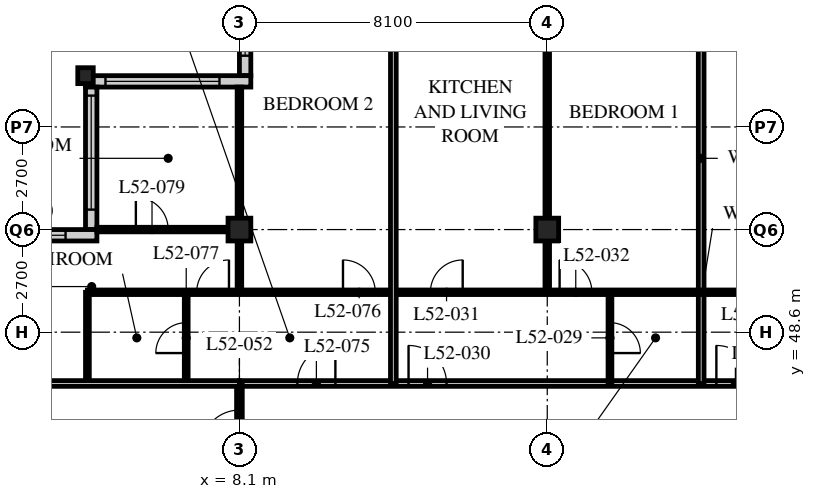
"""IFC4 building model, lengths in metres.
Left out: names, types, materials, properties, quantities, classifications, styles, units other than length and angle.
Written with IfcOpenShell. Run it as: python <this file> out.ifc"""

import sys

from ifc_helpers import new_model, si_unit, direction, frame, frame_2d, origin, origin_2d, place, context, subcontext, project, spatial, rectangle, hollow_rectangle, i_section, extrude, element, fill, save


model = new_model("IFC4")
c1 = context("Model", 3, precision=1e-05, world=origin(), true_north=direction((0.0, 1.0)))
c2 = subcontext(c1, "Body", "Model", "MODEL_VIEW")
j1 = project(units=[si_unit("LENGTHUNIT", "METRE"), si_unit("PLANEANGLEUNIT", "RADIAN")], contexts=[c1])
p1 = place(None, origin())
s1 = spatial("IfcSite", under=j1, at=p1, CompositionType="ELEMENT")
p2 = place(p1, origin())
s2 = spatial("IfcBuilding", under=s1, at=p2, CompositionType="ELEMENT")
p3 = place(p2, frame((0.0, 0.0, 202.8)))
s3 = spatial("IfcBuildingStorey", under=s2, at=p3, CompositionType="ELEMENT", Elevation=202.8)
p4 = place(p3, frame((4.05, 55.35, 0.0), z_axis=(0.0, 0.0, 1.0), x_axis=(1.0, 0.0, 0.0)))
e1 = element("IfcColumn", 1, at=p4, inside=s3, PredefinedType="COLUMN", context=c2, shape_type="SweptSolid", body=[
    extrude(i_section(OverallWidth=0.407, OverallDepth=0.419, WebThickness=0.031, FlangeThickness=0.049, FilletRadius=0.015, at=origin_2d()), origin(), (0.0, 0.0, 1.0), 3.6),
])
for number, where, z_axis, x_axis in (
    (2, (8.1, 51.3, 0.0), (0.0, 0.0, 1.0), (1.0, 0.0, 0.0)),
    (3, (16.2, 51.3, 0.0), (0.0, 0.0, 1.0), (1.0, 0.0, 0.0)),
):
    element("IfcColumn", number, at=place(p3, frame(where, z_axis=z_axis, x_axis=x_axis)), inside=s3, PredefinedType="COLUMN", context=c2, shape_type="SweptSolid", body=[
        extrude(hollow_rectangle(XDim=0.6, YDim=0.6, WallThickness=0.05, at=origin_2d()), origin(), (0.0, 0.0, 1.0), 3.6),
    ])
p5 = place(p3, frame((8.25, 59.1, 0.0), z_axis=(0.0, 0.0, 1.0), x_axis=(0.0, -1.0, 0.0)))
e4 = element("IfcWall", 4, at=p5, inside=s3, PredefinedType="SOLIDWALL", context=c2, shape_type="SweptSolid", body=[
    extrude(rectangle(XDim=3.75, YDim=0.3, at=frame_2d((1.875, 0.0))), origin(), (0.0, 0.0, 1.0), 3.39),
])
p6 = place(p5, frame((0.225, 0.0, 0.6)))
e5 = element("IfcOpeningElement", 5, at=p6, cuts=e4, PredefinedType="OPENING", context=c2, shape_type="SweptSolid", body=[
    extrude(rectangle(XDim=3.0, YDim=2.0, at=frame_2d((1.5, 1.0))), frame((0.0, 0.16, 0.0), z_axis=(0.0, -1.0, 0.0), x_axis=(1.0, 0.0, 0.0)), (0.0, 0.0, 1.0), 0.32),
])
p7 = place(p3, frame((8.4, 55.2, 0.0), z_axis=(0.0, 0.0, 1.0), x_axis=(-1.0, 0.0, 0.0)))
e6 = element("IfcWall", 6, at=p7, inside=s3, PredefinedType="SOLIDWALL", context=c2, shape_type="SweptSolid", body=[
    extrude(rectangle(XDim=4.35, YDim=0.3, at=frame_2d((2.175, 0.0))), origin(), (0.0, 0.0, 1.0), 3.39),
])
p8 = place(p7, frame((0.825, 0.0, 0.6)))
e7 = element("IfcOpeningElement", 7, at=p8, cuts=e6, PredefinedType="OPENING", context=c2, shape_type="SweptSolid", body=[
    extrude(rectangle(XDim=3.0, YDim=2.0, at=frame_2d((1.5, 1.0))), frame((0.0, 0.16, 0.0), z_axis=(0.0, -1.0, 0.0), x_axis=(1.0, 0.0, 0.0)), (0.0, 0.0, 1.0), 0.32),
])
p9 = place(p3, frame((4.2, 55.05, 0.0), z_axis=(0.0, 0.0, 1.0), x_axis=(0.0, -1.0, 0.0)))
e8 = element("IfcWall", 8, at=p9, inside=s3, PredefinedType="SOLIDWALL", context=c2, shape_type="SweptSolid", body=[
    extrude(rectangle(XDim=3.75, YDim=0.3, at=frame_2d((1.875, 0.0))), origin(), (0.0, 0.0, 1.0), 3.39),
])
p10 = place(p9, frame((0.225, 0.0, 0.6)))
e9 = element("IfcOpeningElement", 9, at=p10, cuts=e8, PredefinedType="OPENING", context=c2, shape_type="SweptSolid", body=[
    extrude(rectangle(XDim=3.0, YDim=2.0, at=frame_2d((1.5, 1.0))), frame((0.0, 0.16, 0.0), z_axis=(0.0, -1.0, 0.0), x_axis=(1.0, 0.0, 0.0)), (0.0, 0.0, 1.0), 0.32),
])
p11 = place(p3, frame((4.35, 51.15, 0.0), z_axis=(0.0, 0.0, 1.0), x_axis=(-1.0, 0.0, 0.0)))
e10 = element("IfcWall", 10, at=p11, inside=s3, PredefinedType="SOLIDWALL", context=c2, shape_type="SweptSolid", body=[
    extrude(rectangle(XDim=4.35, YDim=0.3, at=frame_2d((2.175, 0.0))), origin(), (0.0, 0.0, 1.0), 3.39),
])
p12 = place(p11, frame((0.825, 0.0, 0.6)))
e11 = element("IfcOpeningElement", 11, at=p12, cuts=e10, PredefinedType="OPENING", context=c2, shape_type="SweptSolid", body=[
    extrude(rectangle(XDim=3.0, YDim=2.0, at=frame_2d((1.5, 1.0))), frame((0.0, 0.16, 0.0), z_axis=(0.0, -1.0, 0.0), x_axis=(1.0, 0.0, 0.0)), (0.0, 0.0, 1.0), 0.32),
])
p13 = place(p3, frame((8.1, 47.25, 0.0), z_axis=(0.0, 0.0, 1.0), x_axis=(1.0, 0.0, 0.0)))
e12 = element("IfcWall", 12, at=p13, inside=s3, PredefinedType="PARTITIONING", context=c2, shape_type="SweptSolid", body=[
    extrude(rectangle(XDim=36.45, YDim=0.15, at=frame_2d((18.225, 0.0))), origin(), (0.0, 0.0, 1.0), 3.39),
])
p14 = place(p13, frame((4.45, 0.0, 0.0)))
e13 = element("IfcOpeningElement", 13, at=p14, cuts=e12, PredefinedType="OPENING", context=c2, shape_type="SweptSolid", body=[
    extrude(rectangle(XDim=1.0, YDim=2.1, at=frame_2d((0.5, 1.05))), frame((0.0, 0.085, 0.0), z_axis=(0.0, -1.0, 0.0), x_axis=(1.0, 0.0, 0.0)), (0.0, 0.0, 1.0), 0.17),
])
p15 = place(p13, frame((12.55, 0.0, 0.0)))
e14 = element("IfcOpeningElement", 14, at=p15, cuts=e12, PredefinedType="OPENING", context=c2, shape_type="SweptSolid", body=[
    extrude(rectangle(XDim=1.0, YDim=2.1, at=frame_2d((0.5, 1.05))), frame((0.0, 0.085, 0.0), z_axis=(0.0, -1.0, 0.0), x_axis=(1.0, 0.0, 0.0)), (0.0, 0.0, 1.0), 0.17),
])
p16 = place(p13, frame((30.7, 0.0, 0.0)))
e15 = element("IfcOpeningElement", 15, at=p16, cuts=e12, PredefinedType="OPENING", context=c2, shape_type="SweptSolid", body=[
    extrude(rectangle(XDim=1.0, YDim=2.1, at=frame_2d((0.5, 1.05))), frame((0.0, 0.085, 0.0), z_axis=(0.0, -1.0, 0.0), x_axis=(1.0, 0.0, 0.0)), (0.0, 0.0, 1.0), 0.17),
])
p17 = place(p13, frame((33.925, 0.0, 0.0)))
e16 = element("IfcOpeningElement", 16, at=p17, cuts=e12, PredefinedType="OPENING", context=c2, shape_type="SweptSolid", body=[
    extrude(rectangle(XDim=1.0, YDim=2.1, at=frame_2d((0.5, 1.05))), frame((0.0, 0.085, 0.0), z_axis=(0.0, -1.0, 0.0), x_axis=(1.0, 0.0, 0.0)), (0.0, 0.0, 1.0), 0.17),
])
p18 = place(p13, frame((1.525, 0.0, 0.0)))
e17 = element("IfcOpeningElement", 17, at=p18, cuts=e12, PredefinedType="OPENING", context=c2, shape_type="SweptSolid", body=[
    extrude(rectangle(XDim=1.0, YDim=2.1, at=frame_2d((0.5, 1.05))), frame((0.0, 0.085, 0.0), z_axis=(0.0, -1.0, 0.0), x_axis=(1.0, 0.0, 0.0)), (0.0, 0.0, 1.0), 0.17),
])
p19 = place(p3, frame((8.1, 18.9, 0.0), z_axis=(0.0, 0.0, 1.0), x_axis=(0.0, 1.0, 0.0)))
e18 = element("IfcWall", 18, at=p19, inside=s3, PredefinedType="PARTITIONING", context=c2, shape_type="SweptSolid", body=[
    extrude(rectangle(XDim=28.35, YDim=0.15, at=frame_2d((14.175, 0.0))), origin(), (0.0, 0.0, 1.0), 2.778),
])
p20 = place(p19, frame((0.9, 0.0, 0.0)))
e19 = element("IfcOpeningElement", 19, at=p20, cuts=e18, PredefinedType="OPENING", context=c2, shape_type="SweptSolid", body=[
    extrude(rectangle(XDim=1.0, YDim=2.1, at=frame_2d((0.5, 1.05))), frame((0.0, 0.085, 0.0), z_axis=(0.0, -1.0, 0.0), x_axis=(1.0, 0.0, 0.0)), (0.0, 0.0, 1.0), 0.17),
])
p21 = place(p19, frame((17.1, 0.0, 0.0)))
e20 = element("IfcOpeningElement", 20, at=p21, cuts=e18, PredefinedType="OPENING", context=c2, shape_type="SweptSolid", body=[
    extrude(rectangle(XDim=1.0, YDim=2.1, at=frame_2d((0.5, 1.05))), frame((0.0, 0.085, 0.0), z_axis=(0.0, -1.0, 0.0), x_axis=(1.0, 0.0, 0.0)), (0.0, 0.0, 1.0), 0.17),
])
p22 = place(p19, frame((26.65, 0.0, 0.0)))
e21 = element("IfcOpeningElement", 21, at=p22, cuts=e18, PredefinedType="OPENING", context=c2, shape_type="SweptSolid", body=[
    extrude(rectangle(XDim=1.0, YDim=2.1, at=frame_2d((0.5, 1.05))), frame((0.0, 0.085, 0.0), z_axis=(0.0, -1.0, 0.0), x_axis=(1.0, 0.0, 0.0)), (0.0, 0.0, 1.0), 0.17),
])
p23 = place(p3, frame((17.85, 47.25, 0.0), z_axis=(0.0, 0.0, 1.0), x_axis=(0.0, 1.0, 0.0)))
e22 = element("IfcWall", 22, at=p23, inside=s3, PredefinedType="PARTITIONING", context=c2, shape_type="SweptSolid", body=[
    extrude(rectangle(XDim=2.4, YDim=0.1, at=frame_2d((1.2, 0.0))), origin(), (0.0, 0.0, 1.0), 3.39),
])
p24 = place(p23, frame((0.8, 0.0, 0.0)))
e23 = element("IfcOpeningElement", 23, at=p24, cuts=e22, PredefinedType="OPENING", context=c2, shape_type="SweptSolid", body=[
    extrude(rectangle(XDim=0.8, YDim=2.1, at=frame_2d((0.4, 1.05))), frame((0.0, 0.06, 0.0), z_axis=(0.0, -1.0, 0.0), x_axis=(1.0, 0.0, 0.0)), (0.0, 0.0, 1.0), 0.12),
])
p25 = place(p3, frame((16.2, 49.65, 0.0), z_axis=(0.0, 0.0, 1.0), x_axis=(0.0, 1.0, 0.0)))
e24 = element("IfcWall", 24, at=p25, inside=s3, PredefinedType="PARTITIONING", context=c2, shape_type="SweptSolid", body=[
    extrude(rectangle(XDim=9.45, YDim=0.12, at=frame_2d((4.725, 0.0))), origin(), (0.0, 0.0, 1.0), 2.778),
])
p26 = place(p3, frame((20.25, 47.25, 0.0), z_axis=(0.0, 0.0, 1.0), x_axis=(0.0, 1.0, 0.0)))
e25 = element("IfcWall", 25, at=p26, inside=s3, PredefinedType="PARTITIONING", context=c2, shape_type="SweptSolid", body=[
    extrude(rectangle(XDim=11.85, YDim=0.15, at=frame_2d((5.925, 0.0))), origin(), (0.0, 0.0, 1.0), 3.39),
])
p27 = place(p3, frame((6.7, 47.25, 0.0), z_axis=(0.0, 0.0, 1.0), x_axis=(0.0, 1.0, 0.0)))
e26 = element("IfcWall", 26, at=p27, inside=s3, PredefinedType="PARTITIONING", context=c2, shape_type="SweptSolid", body=[
    extrude(rectangle(XDim=2.4, YDim=0.1, at=frame_2d((1.2, 0.0))), origin(), (0.0, 0.0, 1.0), 3.39),
])
p28 = place(p27, frame((0.8, 0.0, 0.0)))
e27 = element("IfcOpeningElement", 27, at=p28, cuts=e26, PredefinedType="OPENING", context=c2, shape_type="SweptSolid", body=[
    extrude(rectangle(XDim=0.8, YDim=2.1, at=frame_2d((0.4, 1.05))), frame((0.0, 0.06, 0.0), z_axis=(0.0, -1.0, 0.0), x_axis=(1.0, 0.0, 0.0)), (0.0, 0.0, 1.0), 0.12),
])
p29 = place(p3, frame((4.1, 47.25, 0.0), z_axis=(0.0, 0.0, 1.0), x_axis=(0.0, 1.0, 0.0)))
e28 = element("IfcWall", 28, at=p29, inside=s3, PredefinedType="PARTITIONING", context=c2, shape_type="SweptSolid", body=[
    extrude(rectangle(XDim=2.4, YDim=0.1, at=frame_2d((1.2, 0.0))), origin(), (0.0, 0.0, 1.0), 3.39),
])
p30 = place(p3, frame((4.1, 49.65, 0.0), z_axis=(0.0, 0.0, 1.0), x_axis=(1.0, 0.0, 0.0)))
e29 = element("IfcWall", 29, at=p30, inside=s3, PredefinedType="PARTITIONING", context=c2, shape_type="SweptSolid", body=[
    extrude(rectangle(XDim=32.35, YDim=0.12, at=frame_2d((16.175, 0.0))), origin(), (0.0, 0.0, 1.0), 3.39),
])
p31 = place(p30, frame((9.025, 0.0, 0.0)))
e30 = element("IfcOpeningElement", 30, at=p31, cuts=e29, PredefinedType="OPENING", context=c2, shape_type="SweptSolid", body=[
    extrude(rectangle(XDim=0.85, YDim=2.1, at=frame_2d((0.425, 1.05))), frame((0.0, 0.07, 0.0), z_axis=(0.0, -1.0, 0.0), x_axis=(1.0, 0.0, 0.0)), (0.0, 0.0, 1.0), 0.14),
])
p32 = place(p30, frame((12.425, 0.0, 0.0)))
e31 = element("IfcOpeningElement", 31, at=p32, cuts=e29, PredefinedType="OPENING", context=c2, shape_type="SweptSolid", body=[
    extrude(rectangle(XDim=0.85, YDim=2.1, at=frame_2d((0.425, 1.05))), frame((0.0, 0.07, 0.0), z_axis=(0.0, -1.0, 0.0), x_axis=(1.0, 0.0, 0.0)), (0.0, 0.0, 1.0), 0.14),
])
p33 = place(p30, frame((17.125, 0.0, 0.0)))
e32 = element("IfcOpeningElement", 32, at=p33, cuts=e29, PredefinedType="OPENING", context=c2, shape_type="SweptSolid", body=[
    extrude(rectangle(XDim=0.85, YDim=2.1, at=frame_2d((0.425, 1.05))), frame((0.0, 0.07, 0.0), z_axis=(0.0, -1.0, 0.0), x_axis=(1.0, 0.0, 0.0)), (0.0, 0.0, 1.0), 0.14),
])
p34 = place(p30, frame((24.575, 0.0, 0.0)))
e33 = element("IfcOpeningElement", 33, at=p34, cuts=e29, PredefinedType="OPENING", context=c2, shape_type="SweptSolid", body=[
    extrude(rectangle(XDim=0.85, YDim=2.1, at=frame_2d((0.425, 1.05))), frame((0.0, 0.07, 0.0), z_axis=(0.0, -1.0, 0.0), x_axis=(1.0, 0.0, 0.0)), (0.0, 0.0, 1.0), 0.14),
])
p35 = place(p30, frame((28.625, 0.0, 0.0)))
e34 = element("IfcOpeningElement", 34, at=p35, cuts=e29, PredefinedType="OPENING", context=c2, shape_type="SweptSolid", body=[
    extrude(rectangle(XDim=0.85, YDim=2.1, at=frame_2d((0.425, 1.05))), frame((0.0, 0.07, 0.0), z_axis=(0.0, -1.0, 0.0), x_axis=(1.0, 0.0, 0.0)), (0.0, 0.0, 1.0), 0.14),
])
p36 = place(p30, frame((6.725, 0.0, 0.0)))
e35 = element("IfcOpeningElement", 35, at=p36, cuts=e29, PredefinedType="OPENING", context=c2, shape_type="SweptSolid", body=[
    extrude(rectangle(XDim=0.85, YDim=2.1, at=frame_2d((0.425, 1.05))), frame((0.0, 0.07, 0.0), z_axis=(0.0, -1.0, 0.0), x_axis=(1.0, 0.0, 0.0)), (0.0, 0.0, 1.0), 0.14),
])
p37 = place(p30, frame((2.875, 0.0, 0.0)))
e36 = element("IfcOpeningElement", 36, at=p37, cuts=e29, PredefinedType="OPENING", context=c2, shape_type="SweptSolid", body=[
    extrude(rectangle(XDim=0.85, YDim=2.1, at=frame_2d((0.425, 1.05))), frame((0.0, 0.07, 0.0), z_axis=(0.0, -1.0, 0.0), x_axis=(1.0, 0.0, 0.0)), (0.0, 0.0, 1.0), 0.14),
])
p38 = place(p3, frame((8.1, 49.65, 0.0), z_axis=(0.0, 0.0, 1.0), x_axis=(0.0, 1.0, 0.0)))
e37 = element("IfcWall", 37, at=p38, inside=s3, PredefinedType="PARTITIONING", context=c2, shape_type="SweptSolid", body=[
    extrude(rectangle(XDim=5.4, YDim=0.12, at=frame_2d((2.7, 0.0))), origin(), (0.0, 0.0, 1.0), 2.778),
])
p39 = place(p3, frame((8.1, 51.3, 0.0), z_axis=(0.0, 0.0, 1.0), x_axis=(-1.0, 0.0, 0.0)))
e38 = element("IfcWall", 38, at=p39, inside=s3, PredefinedType="PARTITIONING", context=c2, shape_type="SweptSolid", body=[
    extrude(rectangle(XDim=3.75, YDim=0.12, at=frame_2d((1.875, 0.0))), origin(), (0.0, 0.0, 1.0), 2.778),
])
p40 = place(p39, frame((1.875, 0.0, 0.0)))
e39 = element("IfcOpeningElement", 39, at=p40, cuts=e38, PredefinedType="OPENING", context=c2, shape_type="SweptSolid", body=[
    extrude(rectangle(XDim=0.85, YDim=2.1, at=frame_2d((0.425, 1.05))), frame((0.0, 0.07, 0.0), z_axis=(0.0, -1.0, 0.0), x_axis=(1.0, 0.0, 0.0)), (0.0, 0.0, 1.0), 0.14),
])
p41 = place(p3, frame((0.3, 47.25, 0.0), z_axis=(0.0, 0.0, 1.0), x_axis=(1.0, 0.0, 0.0)))
e40 = element("IfcWall", 40, at=p41, inside=s3, PredefinedType="PARTITIONING", context=c2, shape_type="SweptSolid", body=[
    extrude(rectangle(XDim=7.8, YDim=0.15, at=frame_2d((3.9, 0.0))), origin(), (0.0, 0.0, 1.0), 3.39),
])
p42 = place(p3, frame((12.15, 47.25, 0.0), z_axis=(0.0, 0.0, 1.0), x_axis=(0.0, 1.0, 0.0)))
e41 = element("IfcWall", 41, at=p42, inside=s3, PredefinedType="PARTITIONING", context=c2, shape_type="SweptSolid", body=[
    extrude(rectangle(XDim=11.85, YDim=0.15, at=frame_2d((5.925, 0.0))), origin(), (0.0, 0.0, 1.0), 3.39),
])
p43 = place(p6, origin())
e42 = element("IfcWindow", 42, at=p43, inside=s3, PartitioningType="SINGLE_PANEL", PredefinedType="WINDOW", context=c2, shape_type="SweptSolid", body=[
    extrude(rectangle(XDim=3.0, YDim=2.0, at=frame_2d((1.5, 1.0))), frame((0.0, 0.03, 0.0), z_axis=(0.0, -1.0, 0.0), x_axis=(1.0, 0.0, 0.0)), (0.0, 0.0, 1.0), 0.06),
])
fill(e5, e42)
p44 = place(p8, origin())
e43 = element("IfcWindow", 43, at=p44, inside=s3, PartitioningType="SINGLE_PANEL", PredefinedType="WINDOW", context=c2, shape_type="SweptSolid", body=[
    extrude(rectangle(XDim=3.0, YDim=2.0, at=frame_2d((1.5, 1.0))), frame((0.0, 0.03, 0.0), z_axis=(0.0, -1.0, 0.0), x_axis=(1.0, 0.0, 0.0)), (0.0, 0.0, 1.0), 0.06),
])
fill(e7, e43)
p45 = place(p10, origin())
e44 = element("IfcWindow", 44, at=p45, inside=s3, PartitioningType="SINGLE_PANEL", PredefinedType="WINDOW", context=c2, shape_type="SweptSolid", body=[
    extrude(rectangle(XDim=3.0, YDim=2.0, at=frame_2d((1.5, 1.0))), frame((0.0, 0.03, 0.0), z_axis=(0.0, -1.0, 0.0), x_axis=(1.0, 0.0, 0.0)), (0.0, 0.0, 1.0), 0.06),
])
fill(e9, e44)
p46 = place(p12, origin())
e45 = element("IfcWindow", 45, at=p46, inside=s3, PartitioningType="SINGLE_PANEL", PredefinedType="WINDOW", context=c2, shape_type="SweptSolid", body=[
    extrude(rectangle(XDim=3.0, YDim=2.0, at=frame_2d((1.5, 1.0))), frame((0.0, 0.03, 0.0), z_axis=(0.0, -1.0, 0.0), x_axis=(1.0, 0.0, 0.0)), (0.0, 0.0, 1.0), 0.06),
])
fill(e11, e45)
p47 = place(p24, origin())
e46 = element("IfcDoor", 46, at=p47, inside=s3, OperationType="SINGLE_SWING_RIGHT", PredefinedType="DOOR", context=c2, shape_type="SweptSolid", body=[
    extrude(rectangle(XDim=0.8, YDim=2.1, at=frame_2d((0.4, 1.05))), frame((0.0, 0.025, 0.0), z_axis=(0.0, -1.0, 0.0), x_axis=(1.0, 0.0, 0.0)), (0.0, 0.0, 1.0), 0.05),
])
fill(e23, e46)
p48 = place(p14, origin())
e47 = element("IfcDoor", 47, at=p48, inside=s3, OperationType="SINGLE_SWING_LEFT", PredefinedType="DOOR", context=c2, shape_type="SweptSolid", body=[
    extrude(rectangle(XDim=1.0, YDim=2.1, at=frame_2d((0.5, 1.05))), frame((0.0, 0.025, 0.0), z_axis=(0.0, -1.0, 0.0), x_axis=(1.0, 0.0, 0.0)), (0.0, 0.0, 1.0), 0.05),
])
fill(e13, e47)
p49 = place(p31, origin())
e48 = element("IfcDoor", 48, at=p49, inside=s3, OperationType="SINGLE_SWING_RIGHT", PredefinedType="DOOR", context=c2, shape_type="SweptSolid", body=[
    extrude(rectangle(XDim=0.85, YDim=2.1, at=frame_2d((0.425, 1.05))), frame((0.0, 0.025, 0.0), z_axis=(0.0, -1.0, 0.0), x_axis=(1.0, 0.0, 0.0)), (0.0, 0.0, 1.0), 0.05),
])
fill(e30, e48)
p50 = place(p32, origin())
e49 = element("IfcDoor", 49, at=p50, inside=s3, OperationType="SINGLE_SWING_LEFT", PredefinedType="DOOR", context=c2, shape_type="SweptSolid", body=[
    extrude(rectangle(XDim=0.85, YDim=2.1, at=frame_2d((0.425, 1.05))), frame((0.0, 0.025, 0.0), z_axis=(0.0, -1.0, 0.0), x_axis=(1.0, 0.0, 0.0)), (0.0, 0.0, 1.0), 0.05),
])
fill(e31, e49)
p51 = place(p15, origin())
e50 = element("IfcDoor", 50, at=p51, inside=s3, OperationType="SINGLE_SWING_LEFT", PredefinedType="DOOR", context=c2, shape_type="SweptSolid", body=[
    extrude(rectangle(XDim=1.0, YDim=2.1, at=frame_2d((0.5, 1.05))), frame((0.0, 0.025, 0.0), z_axis=(0.0, -1.0, 0.0), x_axis=(1.0, 0.0, 0.0)), (0.0, 0.0, 1.0), 0.05),
])
fill(e14, e50)
p52 = place(p22, origin())
e51 = element("IfcDoor", 51, at=p52, inside=s3, OperationType="SINGLE_SWING_LEFT", PredefinedType="DOOR", context=c2, shape_type="SweptSolid", body=[
    extrude(rectangle(XDim=1.0, YDim=2.1, at=frame_2d((0.5, 1.05))), frame((0.0, 0.025, 0.0), z_axis=(0.0, -1.0, 0.0), x_axis=(1.0, 0.0, 0.0)), (0.0, 0.0, 1.0), 0.05),
])
fill(e21, e51)
p53 = place(p18, origin())
e52 = element("IfcDoor", 52, at=p53, inside=s3, OperationType="SINGLE_SWING_RIGHT", PredefinedType="DOOR", context=c2, shape_type="SweptSolid", body=[
    extrude(rectangle(XDim=1.0, YDim=2.1, at=frame_2d((0.5, 1.05))), frame((0.0, 0.025, 0.0), z_axis=(0.0, -1.0, 0.0), x_axis=(1.0, 0.0, 0.0)), (0.0, 0.0, 1.0), 0.05),
])
fill(e17, e52)
p54 = place(p36, origin())
e53 = element("IfcDoor", 53, at=p54, inside=s3, OperationType="SINGLE_SWING_LEFT", PredefinedType="DOOR", context=c2, shape_type="SweptSolid", body=[
    extrude(rectangle(XDim=0.85, YDim=2.1, at=frame_2d((0.425, 1.05))), frame((0.0, 0.025, 0.0), z_axis=(0.0, -1.0, 0.0), x_axis=(1.0, 0.0, 0.0)), (0.0, 0.0, 1.0), 0.05),
])
fill(e35, e53)
p55 = place(p28, origin())
e54 = element("IfcDoor", 54, at=p55, inside=s3, OperationType="SINGLE_SWING_LEFT", PredefinedType="DOOR", context=c2, shape_type="SweptSolid", body=[
    extrude(rectangle(XDim=0.8, YDim=2.1, at=frame_2d((0.4, 1.05))), frame((0.0, 0.025, 0.0), z_axis=(0.0, -1.0, 0.0), x_axis=(1.0, 0.0, 0.0)), (0.0, 0.0, 1.0), 0.05),
])
fill(e27, e54)
p56 = place(p37, origin())
e55 = element("IfcDoor", 55, at=p56, inside=s3, OperationType="SINGLE_SWING_RIGHT", PredefinedType="DOOR", context=c2, shape_type="SweptSolid", body=[
    extrude(rectangle(XDim=0.85, YDim=2.1, at=frame_2d((0.425, 1.05))), frame((0.0, 0.025, 0.0), z_axis=(0.0, -1.0, 0.0), x_axis=(1.0, 0.0, 0.0)), (0.0, 0.0, 1.0), 0.05),
])
fill(e36, e55)
p57 = place(p40, origin())
e56 = element("IfcDoor", 56, at=p57, inside=s3, OperationType="SINGLE_SWING_LEFT", PredefinedType="DOOR", context=c2, shape_type="SweptSolid", body=[
    extrude(rectangle(XDim=0.85, YDim=2.1, at=frame_2d((0.425, 1.05))), frame((0.0, 0.025, 0.0), z_axis=(0.0, -1.0, 0.0), x_axis=(1.0, 0.0, 0.0)), (0.0, 0.0, 1.0), 0.05),
])
fill(e39, e56)
save(model, sys.argv[1])
